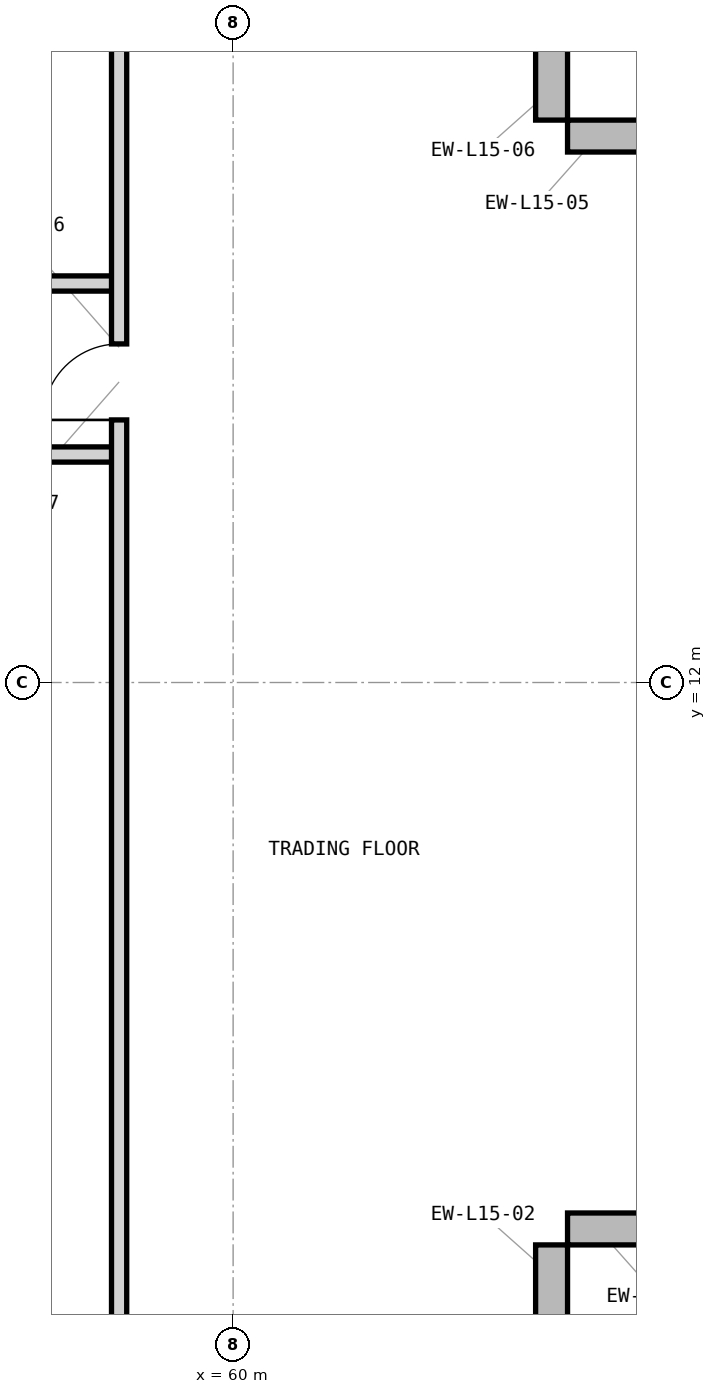
"""IFC4 building model, lengths in metres.
Left out: names, types, materials, properties, quantities, classifications, styles, units other than length and angle.
Written with IfcOpenShell. Run it as: python <this file> out.ifc"""

import sys

from ifc_helpers import new_model, si_unit, direction, frame, frame_2d, origin, place, context, subcontext, project, spatial, rectangle, extrude, element, fill, save


model = new_model("IFC4")
c1 = context("Model", 3, precision=1e-05, world=origin(), true_north=direction((0.0, 1.0)))
c2 = subcontext(c1, "Body", "Model", "MODEL_VIEW")
j1 = project(units=[si_unit("LENGTHUNIT", "METRE"), si_unit("PLANEANGLEUNIT", "RADIAN")], contexts=[c1])
p1 = place(None, origin())
s1 = spatial("IfcSite", under=j1, at=p1, CompositionType="ELEMENT")
p2 = place(p1, origin())
s2 = spatial("IfcBuilding", under=s1, at=p2, CompositionType="ELEMENT")
p3 = place(p2, frame((0.0, 0.0, 67.8)))
s3 = spatial("IfcBuildingStorey", under=s2, at=p3, CompositionType="ELEMENT", Elevation=67.8)
for number, where, z_axis, x_axis in (
    (1, (64.19, 3.0, 0.0), (0.0, 0.0, 1.0), (0.0, 1.0, 0.0)),
    (2, (64.4, 4.81, 0.0), (0.0, 0.0, 1.0), (1.0, 0.0, 0.0)),
    (3, (66.0, 19.19, 0.0), (0.0, 0.0, 1.0), (-1.0, 0.0, 0.0)),
    (4, (64.19, 19.4, 0.0), (0.0, 0.0, 1.0), (0.0, 1.0, 0.0)),
):
    element("IfcWall", number, at=place(p3, frame(where, z_axis=z_axis, x_axis=x_axis)), inside=s3, PredefinedType="STANDARD", context=c2, shape_type="SweptSolid", body=[
        extrude(rectangle(XDim=1.6, YDim=0.42, at=frame_2d((0.8, 0.0))), origin(), (0.0, 0.0, 1.0), 3.98),
    ])
p4 = place(p3, frame((50.7, 15.0, 0.0), z_axis=(0.0, 0.0, 1.0), x_axis=(1.0, 0.0, 0.0)))
e5 = element("IfcWall", 5, at=p4, inside=s3, PredefinedType="PARTITIONING", context=c2, shape_type="SweptSolid", body=[
    extrude(rectangle(XDim=7.8, YDim=0.2, at=frame_2d((3.9, 0.0))), origin(), (0.0, 0.0, 1.0), 3.426),
])
p5 = place(p4, frame((3.4, 0.0, 0.0)))
e6 = element("IfcOpeningElement", 6, at=p5, cuts=e5, PredefinedType="OPENING", context=c2, shape_type="SweptSolid", body=[
    extrude(rectangle(XDim=1.0, YDim=2.15, at=frame_2d((0.5, 1.075))), frame((0.0, 0.11, 0.0), z_axis=(0.0, -1.0, 0.0), x_axis=(1.0, 0.0, 0.0)), (0.0, 0.0, 1.0), 0.22),
])
p6 = place(p3, frame((43.2, 17.25, 0.0), z_axis=(0.0, 0.0, 1.0), x_axis=(1.0, 0.0, 0.0)))
e7 = element("IfcWall", 7, at=p6, inside=s3, PredefinedType="PARTITIONING", context=c2, shape_type="SweptSolid", body=[
    extrude(rectangle(XDim=15.3, YDim=0.2, at=frame_2d((7.65, 0.0))), origin(), (0.0, 0.0, 1.0), 3.97),
])
p7 = place(p6, frame((6.9, 0.0, 0.0)))
e8 = element("IfcOpeningElement", 8, at=p7, cuts=e7, PredefinedType="OPENING", context=c2, shape_type="SweptSolid", body=[
    extrude(rectangle(XDim=1.5, YDim=2.3, at=frame_2d((0.75, 1.15))), frame((0.0, 0.11, 0.0), z_axis=(0.0, -1.0, 0.0), x_axis=(1.0, 0.0, 0.0)), (0.0, 0.0, 1.0), 0.22),
])
p8 = place(p3, frame((58.5, 3.18, 0.0), z_axis=(0.0, 0.0, 1.0), x_axis=(0.0, 1.0, 0.0)))
e9 = element("IfcWall", 9, at=p8, inside=s3, PredefinedType="PARTITIONING", context=c2, shape_type="SweptSolid", body=[
    extrude(rectangle(XDim=17.64, YDim=0.2, at=frame_2d((8.82, 0.0))), origin(), (0.0, 0.0, 1.0), 3.97),
])
p9 = place(p8, frame((12.275, 0.0, 0.0)))
e10 = element("IfcOpeningElement", 10, at=p9, cuts=e9, PredefinedType="OPENING", context=c2, shape_type="SweptSolid", body=[
    extrude(rectangle(XDim=1.0, YDim=2.15, at=frame_2d((0.5, 1.075))), frame((0.0, 0.11, 0.0), z_axis=(0.0, -1.0, 0.0), x_axis=(1.0, 0.0, 0.0)), (0.0, 0.0, 1.0), 0.22),
])
p10 = place(p9, origin())
e11 = element("IfcDoor", 11, at=p10, inside=s3, OperationType="SINGLE_SWING_LEFT", PredefinedType="DOOR", context=c2, shape_type="SweptSolid", body=[
    extrude(rectangle(XDim=1.0, YDim=2.15, at=frame_2d((0.5, 1.075))), frame((0.0, 0.025, 0.0), z_axis=(0.0, -1.0, 0.0), x_axis=(1.0, 0.0, 0.0)), (0.0, 0.0, 1.0), 0.05),
])
fill(e10, e11)
save(model, sys.argv[1])
